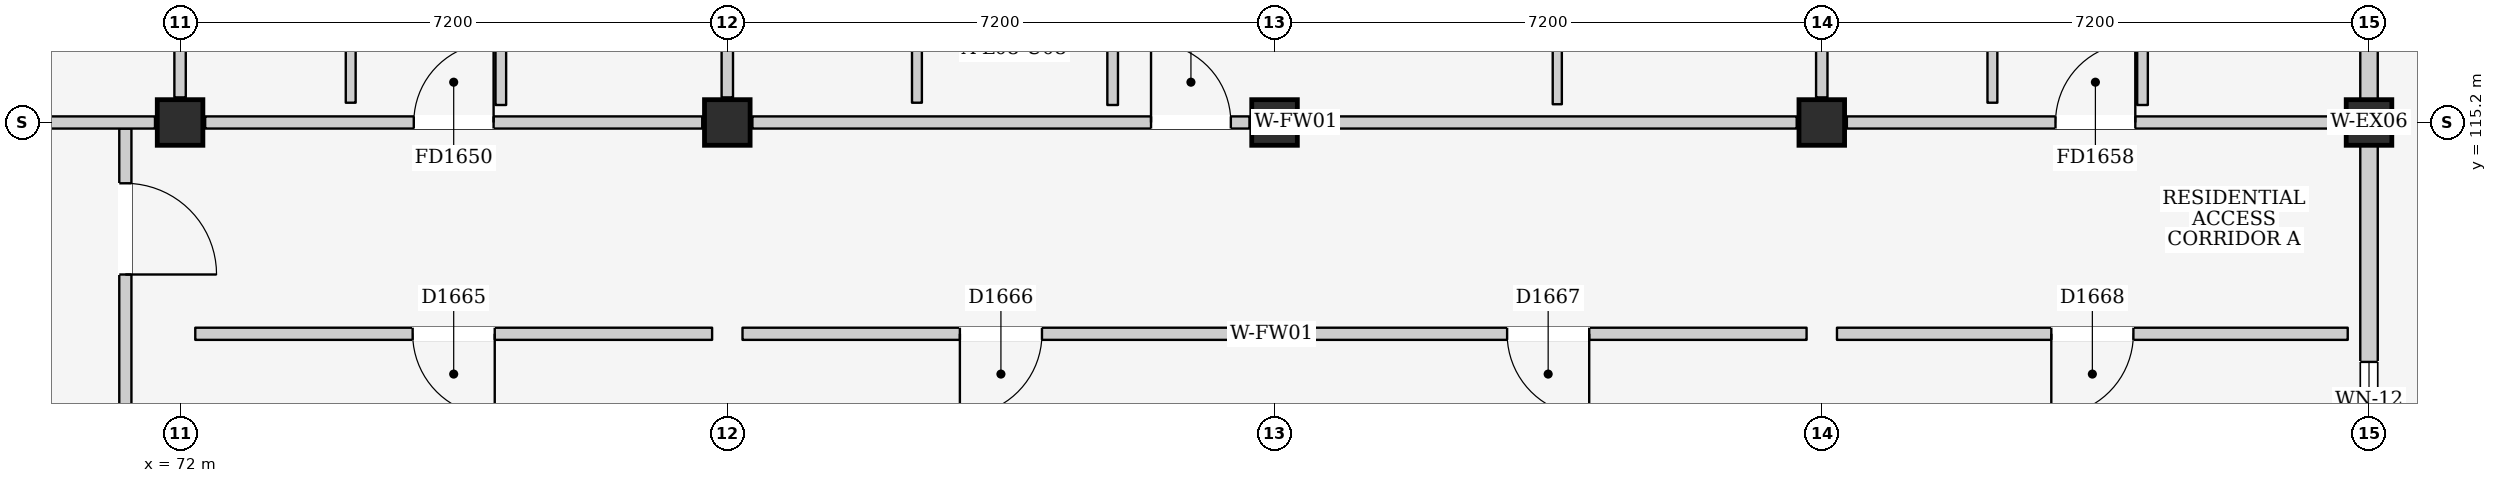
"""IFC4 building model, lengths in metres.
Left out: names, types, materials, properties, quantities, classifications, styles, units other than length and angle.
Written with IfcOpenShell. Run it as: python <this file> out.ifc"""

import sys

from ifc_helpers import new_model, si_unit, direction, frame, frame_2d, origin, origin_2d, place, context, subcontext, project, spatial, rectangle, extrude, element, fill, save


model = new_model("IFC4")
c1 = context("Model", 3, precision=1e-05, world=origin(), true_north=direction((0.0, 1.0)))
c2 = subcontext(c1, "Body", "Model", "MODEL_VIEW")
j1 = project(units=[si_unit("LENGTHUNIT", "METRE"), si_unit("PLANEANGLEUNIT", "RADIAN")], contexts=[c1])
p1 = place(None, origin())
s1 = spatial("IfcSite", under=j1, at=p1, CompositionType="ELEMENT")
p2 = place(p1, origin())
s2 = spatial("IfcBuilding", under=s1, at=p2, CompositionType="ELEMENT")
p3 = place(p2, frame((0.0, 0.0, 28.3)))
s3 = spatial("IfcBuildingStorey", under=s2, at=p3, CompositionType="ELEMENT", Elevation=28.3)
for number, where, z_axis, x_axis in (
    (1, (72.0, 115.2, 0.0), (0.0, 0.0, 1.0), (1.0, 0.0, 0.0)),
    (2, (79.2, 115.2, 0.0), (0.0, 0.0, 1.0), (1.0, 0.0, 0.0)),
    (3, (86.4, 115.2, 0.0), (0.0, 0.0, 1.0), (1.0, 0.0, 0.0)),
    (4, (93.6, 115.2, 0.0), (0.0, 0.0, 1.0), (1.0, 0.0, 0.0)),
    (5, (100.8, 115.2, 0.0), (0.0, 0.0, 1.0), (1.0, 0.0, 0.0)),
):
    element("IfcColumn", number, at=place(p3, frame(where, z_axis=z_axis, x_axis=x_axis)), inside=s3, PredefinedType="COLUMN", context=c2, shape_type="SweptSolid", body=[
        extrude(rectangle(XDim=0.6, YDim=0.6, at=origin_2d()), origin(), (0.0, 0.0, 1.0), 3.2),
    ])
p4 = place(p3, frame((100.8, 108.3, 0.0), z_axis=(0.0, 0.0, 1.0), x_axis=(0.0, 1.0, 0.0)))
e6 = element("IfcWall", 6, at=p4, inside=s3, PredefinedType="ELEMENTEDWALL", context=c2, shape_type="SweptSolid", body=[
    extrude(rectangle(XDim=6.6, YDim=0.23, at=frame_2d((3.3, 0.0))), origin(), (0.0, 0.0, 1.0), 2.435),
])
p5 = place(p4, frame((2.75, 0.0, 1.1)))
e7 = element("IfcOpeningElement", 7, at=p5, cuts=e6, PredefinedType="OPENING", context=c2, shape_type="SweptSolid", body=[
    extrude(rectangle(XDim=1.0, YDim=0.9, at=frame_2d((0.5, 0.45))), frame((0.0, 0.13, 0.0), z_axis=(0.0, -1.0, 0.0), x_axis=(1.0, 0.0, 0.0)), (0.0, 0.0, 1.0), 0.26),
])
p6 = place(p3, frame((100.8, 115.5, 0.0), z_axis=(0.0, 0.0, 1.0), x_axis=(0.0, 1.0, 0.0)))
e8 = element("IfcWall", 8, at=p6, inside=s3, PredefinedType="ELEMENTEDWALL", context=c2, shape_type="SweptSolid", body=[
    extrude(rectangle(XDim=6.6, YDim=0.23, at=frame_2d((3.3, 0.0))), origin(), (0.0, 0.0, 1.0), 2.435),
])
p7 = place(p6, frame((3.6, 0.0, 0.0)))
e9 = element("IfcOpeningElement", 9, at=p7, cuts=e8, PredefinedType="OPENING", context=c2, shape_type="SweptSolid", body=[
    extrude(rectangle(XDim=1.08, YDim=2.12, at=frame_2d((0.54, 1.06))), frame((0.0, 0.13, 0.0), z_axis=(0.0, -1.0, 0.0), x_axis=(1.0, 0.0, 0.0)), (0.0, 0.0, 1.0), 0.26),
])
p8 = place(p3, frame((71.28, 110.8, 0.0), z_axis=(0.0, 0.0, 1.0), x_axis=(0.0, 1.0, 0.0)))
e10 = element("IfcWall", 10, at=p8, inside=s3, PredefinedType="PARTITIONING", context=c2, shape_type="SweptSolid", body=[
    extrude(rectangle(XDim=4.32, YDim=0.16, at=frame_2d((2.16, 0.0))), origin(), (0.0, 0.0, 1.0), 2.95),
])
p9 = place(p8, frame((2.4, 0.0, 0.0)))
e11 = element("IfcOpeningElement", 11, at=p9, cuts=e10, PredefinedType="OPENING", context=c2, shape_type="SweptSolid", body=[
    extrude(rectangle(XDim=1.2, YDim=2.2, at=frame_2d((0.6, 1.1))), frame((0.0, 0.095, 0.0), z_axis=(0.0, -1.0, 0.0), x_axis=(1.0, 0.0, 0.0)), (0.0, 0.0, 1.0), 0.19),
])
p10 = place(p3, frame((65.13, 115.2, 0.0), z_axis=(0.0, 0.0, 1.0), x_axis=(1.0, 0.0, 0.0)))
e12 = element("IfcWall", 12, at=p10, inside=s3, PredefinedType="PARTITIONING", context=c2, shape_type="SweptSolid", body=[
    extrude(rectangle(XDim=6.54, YDim=0.16, at=frame_2d((3.27, 0.0))), origin(), (0.0, 0.0, 1.0), 2.285),
])
p11 = place(p10, frame((2.745, 0.0, 0.0)))
e13 = element("IfcOpeningElement", 13, at=p11, cuts=e12, PredefinedType="OPENING", context=c2, shape_type="SweptSolid", body=[
    extrude(rectangle(XDim=1.05, YDim=2.15, at=frame_2d((0.525, 1.075))), frame((0.0, 0.095, 0.0), z_axis=(0.0, -1.0, 0.0), x_axis=(1.0, 0.0, 0.0)), (0.0, 0.0, 1.0), 0.19),
])
p12 = place(p3, frame((72.0, 115.53, 0.0), z_axis=(0.0, 0.0, 1.0), x_axis=(0.0, 1.0, 0.0)))
e14 = element("IfcWall", 14, at=p12, inside=s3, PredefinedType="PARTITIONING", context=c2, shape_type="SweptSolid", body=[
    extrude(rectangle(XDim=6.54, YDim=0.15, at=frame_2d((3.27, 0.0))), origin(), (0.0, 0.0, 1.0), 2.435),
])
p13 = place(p3, frame((72.33, 115.2, 0.0), z_axis=(0.0, 0.0, 1.0), x_axis=(1.0, 0.0, 0.0)))
e15 = element("IfcWall", 15, at=p13, inside=s3, PredefinedType="PARTITIONING", context=c2, shape_type="SweptSolid", body=[
    extrude(rectangle(XDim=6.54, YDim=0.16, at=frame_2d((3.27, 0.0))), origin(), (0.0, 0.0, 1.0), 2.285),
])
p14 = place(p13, frame((2.745, 0.0, 0.0)))
e16 = element("IfcOpeningElement", 16, at=p14, cuts=e15, PredefinedType="OPENING", context=c2, shape_type="SweptSolid", body=[
    extrude(rectangle(XDim=1.05, YDim=2.15, at=frame_2d((0.525, 1.075))), frame((0.0, 0.095, 0.0), z_axis=(0.0, -1.0, 0.0), x_axis=(1.0, 0.0, 0.0)), (0.0, 0.0, 1.0), 0.19),
])
p15 = place(p3, frame((79.2, 115.53, 0.0), z_axis=(0.0, 0.0, 1.0), x_axis=(0.0, 1.0, 0.0)))
e17 = element("IfcWall", 17, at=p15, inside=s3, PredefinedType="PARTITIONING", context=c2, shape_type="SweptSolid", body=[
    extrude(rectangle(XDim=6.54, YDim=0.15, at=frame_2d((3.27, 0.0))), origin(), (0.0, 0.0, 1.0), 2.435),
])
p16 = place(p3, frame((74.245, 115.46, 0.0), z_axis=(0.0, 0.0, 1.0), x_axis=(0.0, 1.0, 0.0)))
e18 = element("IfcWall", 18, at=p16, inside=s3, PredefinedType="PARTITIONING", context=c2, shape_type="SweptSolid", body=[
    extrude(rectangle(XDim=2.13, YDim=0.13, at=frame_2d((1.065, 0.0))), origin(), (0.0, 0.0, 1.0), 2.95),
])
p17 = place(p3, frame((76.22, 115.43, 0.0), z_axis=(0.0, 0.0, 1.0), x_axis=(0.0, 1.0, 0.0)))
e19 = element("IfcWall", 19, at=p17, inside=s3, PredefinedType="PARTITIONING", context=c2, shape_type="SweptSolid", body=[
    extrude(rectangle(XDim=2.15, YDim=0.14, at=frame_2d((1.075, 0.0))), origin(), (0.0, 0.0, 1.0), 2.95),
])
p18 = place(p3, frame((79.53, 115.2, 0.0), z_axis=(0.0, 0.0, 1.0), x_axis=(1.0, 0.0, 0.0)))
e20 = element("IfcWall", 20, at=p18, inside=s3, PredefinedType="PARTITIONING", context=c2, shape_type="SweptSolid", body=[
    extrude(rectangle(XDim=6.54, YDim=0.16, at=frame_2d((3.27, 0.0))), origin(), (0.0, 0.0, 1.0), 2.285),
])
p19 = place(p18, frame((5.245, 0.0, 0.0)))
e21 = element("IfcOpeningElement", 21, at=p19, cuts=e20, PredefinedType="OPENING", context=c2, shape_type="SweptSolid", body=[
    extrude(rectangle(XDim=1.05, YDim=2.15, at=frame_2d((0.525, 1.075))), frame((0.0, 0.095, 0.0), z_axis=(0.0, -1.0, 0.0), x_axis=(1.0, 0.0, 0.0)), (0.0, 0.0, 1.0), 0.19),
])
p20 = place(p3, frame((86.73, 115.2, 0.0), z_axis=(0.0, 0.0, 1.0), x_axis=(1.0, 0.0, 0.0)))
e22 = element("IfcWall", 22, at=p20, inside=s3, PredefinedType="PARTITIONING", context=c2, shape_type="SweptSolid", body=[
    extrude(rectangle(XDim=6.54, YDim=0.16, at=frame_2d((3.27, 0.0))), origin(), (0.0, 0.0, 1.0), 2.285),
])
p21 = place(p3, frame((93.6, 115.53, 0.0), z_axis=(0.0, 0.0, 1.0), x_axis=(0.0, 1.0, 0.0)))
e23 = element("IfcWall", 23, at=p21, inside=s3, PredefinedType="PARTITIONING", context=c2, shape_type="SweptSolid", body=[
    extrude(rectangle(XDim=6.54, YDim=0.15, at=frame_2d((3.27, 0.0))), origin(), (0.0, 0.0, 1.0), 2.435),
])
p22 = place(p3, frame((81.695, 115.46, 0.0), z_axis=(0.0, 0.0, 1.0), x_axis=(0.0, 1.0, 0.0)))
e24 = element("IfcWall", 24, at=p22, inside=s3, PredefinedType="PARTITIONING", context=c2, shape_type="SweptSolid", body=[
    extrude(rectangle(XDim=3.04, YDim=0.13, at=frame_2d((1.52, 0.0))), origin(), (0.0, 0.0, 1.0), 2.95),
])
p23 = place(p3, frame((84.27, 115.43, 0.0), z_axis=(0.0, 0.0, 1.0), x_axis=(0.0, 1.0, 0.0)))
e25 = element("IfcWall", 25, at=p23, inside=s3, PredefinedType="PARTITIONING", context=c2, shape_type="SweptSolid", body=[
    extrude(rectangle(XDim=3.06, YDim=0.14, at=frame_2d((1.53, 0.0))), origin(), (0.0, 0.0, 1.0), 2.95),
])
p24 = place(p3, frame((90.12, 115.44, 0.0), z_axis=(0.0, 0.0, 1.0), x_axis=(0.0, 1.0, 0.0)))
e26 = element("IfcWall", 26, at=p24, inside=s3, PredefinedType="PARTITIONING", context=c2, shape_type="SweptSolid", body=[
    extrude(rectangle(XDim=3.04, YDim=0.12, at=frame_2d((1.52, 0.0))), origin(), (0.0, 0.0, 1.0), 2.95),
])
p25 = place(p24, frame((1.04, 0.0, 0.0)))
e27 = element("IfcOpeningElement", 27, at=p25, cuts=e26, PredefinedType="OPENING", context=c2, shape_type="SweptSolid", body=[
    extrude(rectangle(XDim=0.96, YDim=2.15, at=frame_2d((0.48, 1.075))), frame((0.0, 0.075, 0.0), z_axis=(0.0, -1.0, 0.0), x_axis=(1.0, 0.0, 0.0)), (0.0, 0.0, 1.0), 0.15),
])
p26 = place(p3, frame((93.93, 115.2, 0.0), z_axis=(0.0, 0.0, 1.0), x_axis=(1.0, 0.0, 0.0)))
e28 = element("IfcWall", 28, at=p26, inside=s3, PredefinedType="PARTITIONING", context=c2, shape_type="SweptSolid", body=[
    extrude(rectangle(XDim=6.54, YDim=0.16, at=frame_2d((3.27, 0.0))), origin(), (0.0, 0.0, 1.0), 2.285),
])
p27 = place(p26, frame((2.745, 0.0, 0.0)))
e29 = element("IfcOpeningElement", 29, at=p27, cuts=e28, PredefinedType="OPENING", context=c2, shape_type="SweptSolid", body=[
    extrude(rectangle(XDim=1.05, YDim=2.15, at=frame_2d((0.525, 1.075))), frame((0.0, 0.095, 0.0), z_axis=(0.0, -1.0, 0.0), x_axis=(1.0, 0.0, 0.0)), (0.0, 0.0, 1.0), 0.19),
])
p28 = place(p3, frame((95.845, 115.46, 0.0), z_axis=(0.0, 0.0, 1.0), x_axis=(0.0, 1.0, 0.0)))
e30 = element("IfcWall", 30, at=p28, inside=s3, PredefinedType="PARTITIONING", context=c2, shape_type="SweptSolid", body=[
    extrude(rectangle(XDim=2.13, YDim=0.13, at=frame_2d((1.065, 0.0))), origin(), (0.0, 0.0, 1.0), 2.95),
])
p29 = place(p3, frame((97.82, 115.43, 0.0), z_axis=(0.0, 0.0, 1.0), x_axis=(0.0, 1.0, 0.0)))
e31 = element("IfcWall", 31, at=p29, inside=s3, PredefinedType="PARTITIONING", context=c2, shape_type="SweptSolid", body=[
    extrude(rectangle(XDim=2.15, YDim=0.14, at=frame_2d((1.075, 0.0))), origin(), (0.0, 0.0, 1.0), 2.95),
])
p30 = place(p3, frame((72.2, 112.42, 0.0), z_axis=(0.0, 0.0, 1.0), x_axis=(1.0, 0.0, 0.0)))
e32 = element("IfcWall", 32, at=p30, inside=s3, PredefinedType="PARTITIONING", context=c2, shape_type="SweptSolid", body=[
    extrude(rectangle(XDim=6.8, YDim=0.16, at=frame_2d((3.4, 0.0))), origin(), (0.0, 0.0, 1.0), 2.95),
])
p31 = place(p30, frame((2.86, 0.0, 0.0)))
e33 = element("IfcOpeningElement", 33, at=p31, cuts=e32, PredefinedType="OPENING", context=c2, shape_type="SweptSolid", body=[
    extrude(rectangle(XDim=1.08, YDim=2.22, at=frame_2d((0.54, 1.11))), frame((0.0, 0.095, 0.0), z_axis=(0.0, -1.0, 0.0), x_axis=(1.0, 0.0, 0.0)), (0.0, 0.0, 1.0), 0.19),
])
p32 = place(p3, frame((79.4, 112.42, 0.0), z_axis=(0.0, 0.0, 1.0), x_axis=(1.0, 0.0, 0.0)))
e34 = element("IfcWall", 34, at=p32, inside=s3, PredefinedType="PARTITIONING", context=c2, shape_type="SweptSolid", body=[
    extrude(rectangle(XDim=6.8, YDim=0.16, at=frame_2d((3.4, 0.0))), origin(), (0.0, 0.0, 1.0), 2.95),
])
p33 = place(p32, frame((2.86, 0.0, 0.0)))
e35 = element("IfcOpeningElement", 35, at=p33, cuts=e34, PredefinedType="OPENING", context=c2, shape_type="SweptSolid", body=[
    extrude(rectangle(XDim=1.08, YDim=2.22, at=frame_2d((0.54, 1.11))), frame((0.0, 0.095, 0.0), z_axis=(0.0, -1.0, 0.0), x_axis=(1.0, 0.0, 0.0)), (0.0, 0.0, 1.0), 0.19),
])
p34 = place(p3, frame((86.6, 112.42, 0.0), z_axis=(0.0, 0.0, 1.0), x_axis=(1.0, 0.0, 0.0)))
e36 = element("IfcWall", 36, at=p34, inside=s3, PredefinedType="PARTITIONING", context=c2, shape_type="SweptSolid", body=[
    extrude(rectangle(XDim=6.8, YDim=0.16, at=frame_2d((3.4, 0.0))), origin(), (0.0, 0.0, 1.0), 2.95),
])
p35 = place(p34, frame((2.86, 0.0, 0.0)))
e37 = element("IfcOpeningElement", 37, at=p35, cuts=e36, PredefinedType="OPENING", context=c2, shape_type="SweptSolid", body=[
    extrude(rectangle(XDim=1.08, YDim=2.22, at=frame_2d((0.54, 1.11))), frame((0.0, 0.095, 0.0), z_axis=(0.0, -1.0, 0.0), x_axis=(1.0, 0.0, 0.0)), (0.0, 0.0, 1.0), 0.19),
])
p36 = place(p3, frame((93.8, 112.42, 0.0), z_axis=(0.0, 0.0, 1.0), x_axis=(1.0, 0.0, 0.0)))
e38 = element("IfcWall", 38, at=p36, inside=s3, PredefinedType="PARTITIONING", context=c2, shape_type="SweptSolid", body=[
    extrude(rectangle(XDim=6.72, YDim=0.16, at=frame_2d((3.36, 0.0))), origin(), (0.0, 0.0, 1.0), 2.95),
])
p37 = place(p36, frame((2.82, 0.0, 0.0)))
e39 = element("IfcOpeningElement", 39, at=p37, cuts=e38, PredefinedType="OPENING", context=c2, shape_type="SweptSolid", body=[
    extrude(rectangle(XDim=1.08, YDim=2.22, at=frame_2d((0.54, 1.11))), frame((0.0, 0.095, 0.0), z_axis=(0.0, -1.0, 0.0), x_axis=(1.0, 0.0, 0.0)), (0.0, 0.0, 1.0), 0.19),
])
p38 = place(p5, origin())
e40 = element("IfcWindow", 40, at=p38, inside=s3, PartitioningType="SINGLE_PANEL", PredefinedType="WINDOW", context=c2, shape_type="SweptSolid", body=[
    extrude(rectangle(XDim=1.0, YDim=0.9, at=frame_2d((0.5, 0.45))), frame((0.0, 0.03, 0.0), z_axis=(0.0, -1.0, 0.0), x_axis=(1.0, 0.0, 0.0)), (0.0, 0.0, 1.0), 0.06),
])
fill(e7, e40)
p39 = place(p9, frame((1.2, 0.0, 0.0), z_axis=(0.0, 0.0, 1.0), x_axis=(-1.0, 0.0, 0.0)))
e41 = element("IfcDoor", 41, at=p39, inside=s3, OperationType="SINGLE_SWING_RIGHT", PredefinedType="DOOR", context=c2, shape_type="SweptSolid", body=[
    extrude(rectangle(XDim=1.2, YDim=2.2, at=frame_2d((0.6, 1.1))), frame((0.0, 0.025, 0.0), z_axis=(0.0, -1.0, 0.0), x_axis=(1.0, 0.0, 0.0)), (0.0, 0.0, 1.0), 0.05),
])
fill(e11, e41)
p40 = place(p14, origin())
e42 = element("IfcDoor", 42, at=p40, inside=s3, OperationType="SINGLE_SWING_RIGHT", PredefinedType="DOOR", context=c2, shape_type="SweptSolid", body=[
    extrude(rectangle(XDim=1.05, YDim=2.15, at=frame_2d((0.525, 1.075))), frame((0.0, 0.025, 0.0), z_axis=(0.0, -1.0, 0.0), x_axis=(1.0, 0.0, 0.0)), (0.0, 0.0, 1.0), 0.05),
])
fill(e16, e42)
p41 = place(p19, origin())
e43 = element("IfcDoor", 43, at=p41, inside=s3, OperationType="SINGLE_SWING_LEFT", PredefinedType="DOOR", context=c2, shape_type="SweptSolid", body=[
    extrude(rectangle(XDim=1.05, YDim=2.15, at=frame_2d((0.525, 1.075))), frame((0.0, 0.025, 0.0), z_axis=(0.0, -1.0, 0.0), x_axis=(1.0, 0.0, 0.0)), (0.0, 0.0, 1.0), 0.05),
])
fill(e21, e43)
p42 = place(p27, origin())
e44 = element("IfcDoor", 44, at=p42, inside=s3, OperationType="SINGLE_SWING_RIGHT", PredefinedType="DOOR", context=c2, shape_type="SweptSolid", body=[
    extrude(rectangle(XDim=1.05, YDim=2.15, at=frame_2d((0.525, 1.075))), frame((0.0, 0.025, 0.0), z_axis=(0.0, -1.0, 0.0), x_axis=(1.0, 0.0, 0.0)), (0.0, 0.0, 1.0), 0.05),
])
fill(e29, e44)
p43 = place(p31, frame((1.08, 0.0, 0.0), z_axis=(0.0, 0.0, 1.0), x_axis=(-1.0, 0.0, 0.0)))
e45 = element("IfcDoor", 45, at=p43, inside=s3, OperationType="SINGLE_SWING_LEFT", PredefinedType="DOOR", context=c2, shape_type="SweptSolid", body=[
    extrude(rectangle(XDim=1.08, YDim=2.22, at=frame_2d((0.54, 1.11))), frame((0.0, 0.025, 0.0), z_axis=(0.0, -1.0, 0.0), x_axis=(1.0, 0.0, 0.0)), (0.0, 0.0, 1.0), 0.05),
])
fill(e33, e45)
p44 = place(p33, frame((1.08, 0.0, 0.0), z_axis=(0.0, 0.0, 1.0), x_axis=(-1.0, 0.0, 0.0)))
e46 = element("IfcDoor", 46, at=p44, inside=s3, OperationType="SINGLE_SWING_RIGHT", PredefinedType="DOOR", context=c2, shape_type="SweptSolid", body=[
    extrude(rectangle(XDim=1.08, YDim=2.22, at=frame_2d((0.54, 1.11))), frame((0.0, 0.025, 0.0), z_axis=(0.0, -1.0, 0.0), x_axis=(1.0, 0.0, 0.0)), (0.0, 0.0, 1.0), 0.05),
])
fill(e35, e46)
p45 = place(p35, frame((1.08, 0.0, 0.0), z_axis=(0.0, 0.0, 1.0), x_axis=(-1.0, 0.0, 0.0)))
e47 = element("IfcDoor", 47, at=p45, inside=s3, OperationType="SINGLE_SWING_LEFT", PredefinedType="DOOR", context=c2, shape_type="SweptSolid", body=[
    extrude(rectangle(XDim=1.08, YDim=2.22, at=frame_2d((0.54, 1.11))), frame((0.0, 0.025, 0.0), z_axis=(0.0, -1.0, 0.0), x_axis=(1.0, 0.0, 0.0)), (0.0, 0.0, 1.0), 0.05),
])
fill(e37, e47)
p46 = place(p37, frame((1.08, 0.0, 0.0), z_axis=(0.0, 0.0, 1.0), x_axis=(-1.0, 0.0, 0.0)))
e48 = element("IfcDoor", 48, at=p46, inside=s3, OperationType="SINGLE_SWING_RIGHT", PredefinedType="DOOR", context=c2, shape_type="SweptSolid", body=[
    extrude(rectangle(XDim=1.08, YDim=2.22, at=frame_2d((0.54, 1.11))), frame((0.0, 0.025, 0.0), z_axis=(0.0, -1.0, 0.0), x_axis=(1.0, 0.0, 0.0)), (0.0, 0.0, 1.0), 0.05),
])
fill(e39, e48)
save(model, sys.argv[1])
